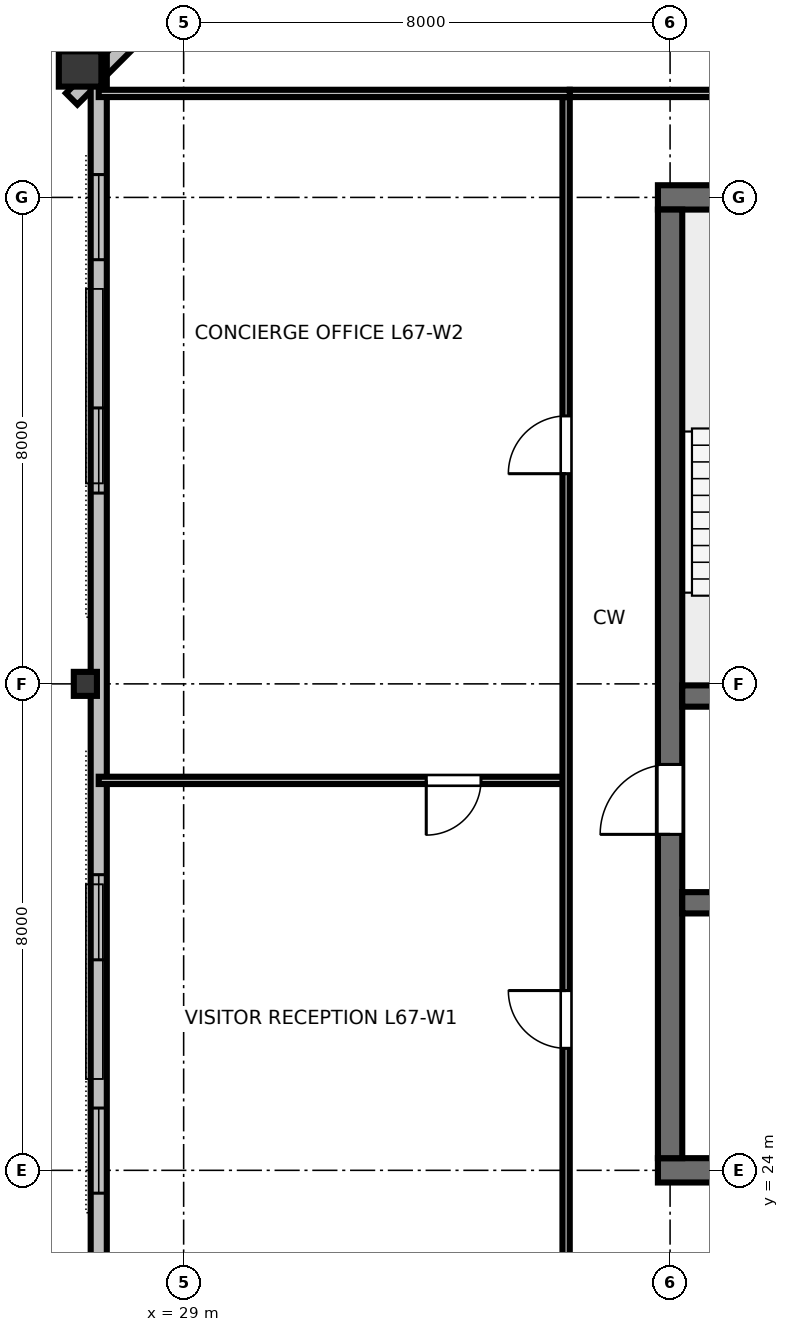
"""IFC4 building model, lengths in metres.
Left out: names, types, materials, properties, quantities, classifications, styles, units other than length and angle.
Written with IfcOpenShell. Run it as: python <this file> out.ifc"""

import sys

from ifc_helpers import new_model, si_unit, direction, frame, frame_2d, origin, origin_2d, place, context, subcontext, project, spatial, rectangle, hollow_rectangle, i_section, extrude, element, fill, save


model = new_model("IFC4")
c1 = context("Model", 3, precision=1e-05, world=origin(), true_north=direction((0.0, 1.0)))
c2 = subcontext(c1, "Body", "Model", "MODEL_VIEW")
j1 = project(units=[si_unit("LENGTHUNIT", "METRE"), si_unit("PLANEANGLEUNIT", "RADIAN")], contexts=[c1])
p1 = place(None, origin())
s1 = spatial("IfcSite", under=j1, at=p1, CompositionType="ELEMENT")
p2 = place(p1, origin())
s2 = spatial("IfcBuilding", under=s1, at=p2, CompositionType="ELEMENT")
p3 = place(p2, frame((0.0, 0.0, 253.8)))
s3 = spatial("IfcBuildingStorey", under=s2, at=p3, CompositionType="ELEMENT", Elevation=253.8)
p4 = place(p3, frame((36.8, 24.0, 0.0), z_axis=(0.0, 0.0, 1.0), x_axis=(1.0, 0.0, 0.0)))
e1 = element("IfcWall", 1, at=p4, inside=s3, PredefinedType="SHEAR", context=c2, shape_type="SweptSolid", body=[
    extrude(rectangle(XDim=18.4, YDim=0.4, at=frame_2d((9.2, 0.0))), origin(), (0.0, 0.0, 1.0), 3.36),
])
p5 = place(p4, frame((13.4, 0.0, 0.0)))
e2 = element("IfcOpeningElement", 2, at=p5, cuts=e1, PredefinedType="OPENING", context=c2, shape_type="SweptSolid", body=[
    extrude(rectangle(XDim=1.6, YDim=2.15, at=frame_2d((0.8, 1.075))), frame((0.0, 0.21, 0.0), z_axis=(0.0, -1.0, 0.0), x_axis=(1.0, 0.0, 0.0)), (0.0, 0.0, 1.0), 0.42),
])
p6 = place(p3, frame((36.8, 40.0, 0.0), z_axis=(0.0, 0.0, 1.0), x_axis=(1.0, 0.0, 0.0)))
e3 = element("IfcWall", 3, at=p6, inside=s3, PredefinedType="SHEAR", context=c2, shape_type="SweptSolid", body=[
    extrude(rectangle(XDim=18.4, YDim=0.4, at=frame_2d((9.2, 0.0))), origin(), (0.0, 0.0, 1.0), 3.36),
])
p7 = place(p6, frame((8.7, 0.0, 0.0)))
e4 = element("IfcOpeningElement", 4, at=p7, cuts=e3, PredefinedType="OPENING", context=c2, shape_type="SweptSolid", body=[
    extrude(rectangle(XDim=1.0, YDim=2.15, at=frame_2d((0.5, 1.075))), frame((0.0, 0.21, 0.0), z_axis=(0.0, -1.0, 0.0), x_axis=(1.0, 0.0, 0.0)), (0.0, 0.0, 1.0), 0.42),
])
p8 = place(p3, frame((37.0, 24.2, 0.0), z_axis=(0.0, 0.0, 1.0), x_axis=(0.0, 1.0, 0.0)))
e5 = element("IfcWall", 5, at=p8, inside=s3, PredefinedType="SHEAR", context=c2, shape_type="SweptSolid", body=[
    extrude(rectangle(XDim=15.6, YDim=0.4, at=frame_2d((7.8, 0.0))), origin(), (0.0, 0.0, 1.0), 3.36),
])
p9 = place(p8, frame((5.325, 0.0, 0.0)))
e6 = element("IfcOpeningElement", 6, at=p9, cuts=e5, PredefinedType="OPENING", context=c2, shape_type="SweptSolid", body=[
    extrude(rectangle(XDim=1.15, YDim=2.15, at=frame_2d((0.575, 1.075))), frame((0.0, 0.21, 0.0), z_axis=(0.0, -1.0, 0.0), x_axis=(1.0, 0.0, 0.0)), (0.0, 0.0, 1.0), 0.42),
])
p10 = place(p3, frame((37.2, 31.8, 0.0), z_axis=(0.0, 0.0, 1.0), x_axis=(1.0, 0.0, 0.0)))
e7 = element("IfcWall", 7, at=p10, inside=s3, PredefinedType="SHEAR", context=c2, shape_type="SweptSolid", body=[
    extrude(rectangle(XDim=17.6, YDim=0.35, at=frame_2d((8.8, 0.0))), origin(), (0.0, 0.0, 1.0), 3.36),
])
p11 = place(p10, frame((0.85, 0.0, 0.0)))
e8 = element("IfcOpeningElement", 8, at=p11, cuts=e7, PredefinedType="OPENING", context=c2, shape_type="SweptSolid", body=[
    extrude(rectangle(XDim=1.1, YDim=2.15, at=frame_2d((0.55, 1.075))), frame((0.0, 0.185, 0.0), z_axis=(0.0, -1.0, 0.0), x_axis=(1.0, 0.0, 0.0)), (0.0, 0.0, 1.0), 0.37),
])
p12 = place(p10, frame((14.75, 0.0, 0.0)))
e9 = element("IfcOpeningElement", 9, at=p12, cuts=e7, PredefinedType="OPENING", context=c2, shape_type="SweptSolid", body=[
    extrude(rectangle(XDim=1.1, YDim=2.15, at=frame_2d((0.55, 1.075))), frame((0.0, 0.185, 0.0), z_axis=(0.0, -1.0, 0.0), x_axis=(1.0, 0.0, 0.0)), (0.0, 0.0, 1.0), 0.37),
])
p13 = place(p3, frame((37.2, 28.4, 0.0), z_axis=(0.0, 0.0, 1.0), x_axis=(1.0, 0.0, 0.0)))
e10 = element("IfcWall", 10, at=p13, inside=s3, PredefinedType="SHEAR", context=c2, shape_type="SweptSolid", body=[
    extrude(rectangle(XDim=17.6, YDim=0.35, at=frame_2d((8.8, 0.0))), origin(), (0.0, 0.0, 1.0), 3.36),
])
p14 = place(p3, frame((27.297, 42.112, 0.0), z_axis=(0.0, 0.0, 1.0), x_axis=(0.0, 1.0, 0.0)))
e11 = element("IfcColumn", 11, at=p14, inside=s3, PredefinedType="COLUMN", context=c2, shape_type="SweptSolid", body=[
    extrude(hollow_rectangle(XDim=0.58, YDim=0.7, WallThickness=0.032, at=origin_2d()), origin(), (0.0, 0.0, 1.0), 3.373),
])
p15 = place(p3, frame((27.384, 32.0, 0.0), z_axis=(0.0, 0.0, 1.0), x_axis=(0.0, 1.0, 0.0)))
e12 = element("IfcColumn", 12, at=p15, inside=s3, PredefinedType="COLUMN", context=c2, shape_type="SweptSolid", body=[
    extrude(i_section(OverallWidth=0.395, OverallDepth=0.38, WebThickness=0.019, FlangeThickness=0.03, FilletRadius=0.025, at=origin_2d()), origin(), (0.0, 0.0, 1.0), 3.373),
])
p16 = place(p3, frame((34.807, 49.269, 0.0), z_axis=(0.0, 0.0, 1.0), x_axis=(-0.707106781187, -0.707106781187, 0.0)))
e13 = element("IfcWall", 13, at=p16, inside=s3, PredefinedType="STANDARD", context=c2, shape_type="SweptSolid", body=[
    extrude(rectangle(XDim=10.816, YDim=0.265, at=frame_2d((5.408, 0.0))), origin(), (0.0, 0.0, 1.0), 2.832),
])
p17 = place(p3, frame((27.604, 42.695, 0.0), z_axis=(0.0, 0.0, 1.0), x_axis=(0.0, -1.0, 0.0)))
e14 = element("IfcWall", 14, at=p17, inside=s3, PredefinedType="STANDARD", context=c2, shape_type="SweptSolid", body=[
    extrude(rectangle(XDim=21.389, YDim=0.265, at=frame_2d((10.695, 0.0))), origin(), (0.0, 0.0, 1.0), 2.832),
])
p18 = place(p17, frame((2.319, 0.0, 0.85)))
e15 = element("IfcOpeningElement", 15, at=p18, cuts=e14, PredefinedType="OPENING", context=c2, shape_type="SweptSolid", body=[
    extrude(rectangle(XDim=1.4, YDim=1.2, at=frame_2d((0.7, 0.6))), frame((0.0, 0.142, 0.0), z_axis=(0.0, -1.0, 0.0), x_axis=(1.0, 0.0, 0.0)), (0.0, 0.0, 1.0), 0.285),
])
p19 = place(p17, frame((6.157, 0.0, 0.85)))
e16 = element("IfcOpeningElement", 16, at=p19, cuts=e14, PredefinedType="OPENING", context=c2, shape_type="SweptSolid", body=[
    extrude(rectangle(XDim=1.4, YDim=1.2, at=frame_2d((0.7, 0.6))), frame((0.0, 0.142, 0.0), z_axis=(0.0, -1.0, 0.0), x_axis=(1.0, 0.0, 0.0)), (0.0, 0.0, 1.0), 0.285),
])
p20 = place(p17, frame((13.832, 0.0, 0.85)))
e17 = element("IfcOpeningElement", 17, at=p20, cuts=e14, PredefinedType="OPENING", context=c2, shape_type="SweptSolid", body=[
    extrude(rectangle(XDim=1.4, YDim=1.2, at=frame_2d((0.7, 0.6))), frame((0.0, 0.142, 0.0), z_axis=(0.0, -1.0, 0.0), x_axis=(1.0, 0.0, 0.0)), (0.0, 0.0, 1.0), 0.285),
])
p21 = place(p17, frame((17.67, 0.0, 0.85)))
e18 = element("IfcOpeningElement", 18, at=p21, cuts=e14, PredefinedType="OPENING", context=c2, shape_type="SweptSolid", body=[
    extrude(rectangle(XDim=1.4, YDim=1.2, at=frame_2d((0.7, 0.6))), frame((0.0, 0.142, 0.0), z_axis=(0.0, -1.0, 0.0), x_axis=(1.0, 0.0, 0.0)), (0.0, 0.0, 1.0), 0.285),
])
p22 = place(p3, frame((35.35, 41.71, 0.0), z_axis=(0.0, 0.0, 1.0), x_axis=(1.0, 0.0, 0.0)))
e19 = element("IfcWall", 19, at=p22, inside=s3, PredefinedType="PARTITIONING", context=c2, shape_type="SweptSolid", body=[
    extrude(rectangle(XDim=21.3, YDim=0.12, at=frame_2d((10.65, 0.0))), origin(), (0.0, 0.0, 1.0), 2.655),
])
p23 = place(p22, frame((3.472, 0.0, 0.0)))
e20 = element("IfcOpeningElement", 20, at=p23, cuts=e19, PredefinedType="OPENING", context=c2, shape_type="SweptSolid", body=[
    extrude(rectangle(XDim=0.95, YDim=2.15, at=frame_2d((0.475, 1.075))), frame((0.0, 0.07, 0.0), z_axis=(0.0, -1.0, 0.0), x_axis=(1.0, 0.0, 0.0)), (0.0, 0.0, 1.0), 0.14),
])
p24 = place(p22, frame((12.975, 0.0, 0.0)))
e21 = element("IfcOpeningElement", 21, at=p24, cuts=e19, PredefinedType="OPENING", context=c2, shape_type="SweptSolid", body=[
    extrude(rectangle(XDim=0.95, YDim=2.15, at=frame_2d((0.475, 1.075))), frame((0.0, 0.07, 0.0), z_axis=(0.0, -1.0, 0.0), x_axis=(1.0, 0.0, 0.0)), (0.0, 0.0, 1.0), 0.14),
])
p25 = place(p22, frame((17.735, 0.0, 0.0)))
e22 = element("IfcOpeningElement", 22, at=p25, cuts=e19, PredefinedType="OPENING", context=c2, shape_type="SweptSolid", body=[
    extrude(rectangle(XDim=0.95, YDim=2.15, at=frame_2d((0.475, 1.075))), frame((0.0, 0.07, 0.0), z_axis=(0.0, -1.0, 0.0), x_axis=(1.0, 0.0, 0.0)), (0.0, 0.0, 1.0), 0.14),
])
p26 = place(p3, frame((35.29, 30.413, 0.0), z_axis=(0.0, 0.0, 1.0), x_axis=(-1.0, 0.0, 0.0)))
e23 = element("IfcWall", 23, at=p26, inside=s3, PredefinedType="PARTITIONING", context=c2, shape_type="SweptSolid", body=[
    extrude(rectangle(XDim=7.687, YDim=0.12, at=frame_2d((3.843, 0.0))), origin(), (0.0, 0.0, 1.0), 2.655),
])
p27 = place(p26, frame((1.4, 0.0, 0.0)))
e24 = element("IfcOpeningElement", 24, at=p27, cuts=e23, PredefinedType="OPENING", context=c2, shape_type="SweptSolid", body=[
    extrude(rectangle(XDim=0.9, YDim=2.15, at=frame_2d((0.45, 1.075))), frame((0.0, 0.07, 0.0), z_axis=(0.0, -1.0, 0.0), x_axis=(1.0, 0.0, 0.0)), (0.0, 0.0, 1.0), 0.14),
])
p28 = place(p3, frame((35.29, 22.35, 0.0), z_axis=(0.0, 0.0, 1.0), x_axis=(0.0, 1.0, 0.0)))
e25 = element("IfcWall", 25, at=p28, inside=s3, PredefinedType="PARTITIONING", context=c2, shape_type="SweptSolid", body=[
    extrude(rectangle(XDim=19.3, YDim=0.12, at=frame_2d((9.65, 0.0))), origin(), (0.0, 0.0, 1.0), 2.655),
])
p29 = place(p28, frame((3.656, 0.0, 0.0)))
e26 = element("IfcOpeningElement", 26, at=p29, cuts=e25, PredefinedType="OPENING", context=c2, shape_type="SweptSolid", body=[
    extrude(rectangle(XDim=0.95, YDim=2.15, at=frame_2d((0.475, 1.075))), frame((0.0, 0.07, 0.0), z_axis=(0.0, -1.0, 0.0), x_axis=(1.0, 0.0, 0.0)), (0.0, 0.0, 1.0), 0.14),
])
p30 = place(p28, frame((13.106, 0.0, 0.0)))
e27 = element("IfcOpeningElement", 27, at=p30, cuts=e25, PredefinedType="OPENING", context=c2, shape_type="SweptSolid", body=[
    extrude(rectangle(XDim=0.95, YDim=2.15, at=frame_2d((0.475, 1.075))), frame((0.0, 0.07, 0.0), z_axis=(0.0, -1.0, 0.0), x_axis=(1.0, 0.0, 0.0)), (0.0, 0.0, 1.0), 0.14),
])
p31 = place(p3, frame((35.35, 41.71, 0.0), z_axis=(0.0, 0.0, 1.0), x_axis=(-1.0, 0.0, 0.0)))
e28 = element("IfcWall", 28, at=p31, inside=s3, PredefinedType="PARTITIONING", context=c2, shape_type="SweptSolid", body=[
    extrude(rectangle(XDim=7.747, YDim=0.12, at=frame_2d((3.873, 0.0))), origin(), (0.0, 0.0, 1.0), 2.655),
])
p32 = place(p18, origin())
e29 = element("IfcWindow", 29, at=p32, inside=s3, PartitioningType="SINGLE_PANEL", PredefinedType="WINDOW", context=c2, shape_type="SweptSolid", body=[
    extrude(rectangle(XDim=1.4, YDim=1.2, at=frame_2d((0.7, 0.6))), frame((0.0, 0.03, 0.0), z_axis=(0.0, -1.0, 0.0), x_axis=(1.0, 0.0, 0.0)), (0.0, 0.0, 1.0), 0.06),
])
fill(e15, e29)
p33 = place(p19, origin())
e30 = element("IfcWindow", 30, at=p33, inside=s3, PartitioningType="SINGLE_PANEL", PredefinedType="WINDOW", context=c2, shape_type="SweptSolid", body=[
    extrude(rectangle(XDim=1.4, YDim=1.2, at=frame_2d((0.7, 0.6))), frame((0.0, 0.03, 0.0), z_axis=(0.0, -1.0, 0.0), x_axis=(1.0, 0.0, 0.0)), (0.0, 0.0, 1.0), 0.06),
])
fill(e16, e30)
p34 = place(p20, origin())
e31 = element("IfcWindow", 31, at=p34, inside=s3, PartitioningType="SINGLE_PANEL", PredefinedType="WINDOW", context=c2, shape_type="SweptSolid", body=[
    extrude(rectangle(XDim=1.4, YDim=1.2, at=frame_2d((0.7, 0.6))), frame((0.0, 0.03, 0.0), z_axis=(0.0, -1.0, 0.0), x_axis=(1.0, 0.0, 0.0)), (0.0, 0.0, 1.0), 0.06),
])
fill(e17, e31)
p35 = place(p21, origin())
e32 = element("IfcWindow", 32, at=p35, inside=s3, PartitioningType="SINGLE_PANEL", PredefinedType="WINDOW", context=c2, shape_type="SweptSolid", body=[
    extrude(rectangle(XDim=1.4, YDim=1.2, at=frame_2d((0.7, 0.6))), frame((0.0, 0.03, 0.0), z_axis=(0.0, -1.0, 0.0), x_axis=(1.0, 0.0, 0.0)), (0.0, 0.0, 1.0), 0.06),
])
fill(e18, e32)
p36 = place(p9, origin())
e33 = element("IfcDoor", 33, at=p36, inside=s3, OperationType="SINGLE_SWING_LEFT", PredefinedType="DOOR", context=c2, shape_type="SweptSolid", body=[
    extrude(rectangle(XDim=1.15, YDim=2.15, at=frame_2d((0.575, 1.075))), frame((0.0, 0.025, 0.0), z_axis=(0.0, -1.0, 0.0), x_axis=(1.0, 0.0, 0.0)), (0.0, 0.0, 1.0), 0.05),
])
fill(e6, e33)
p37 = place(p27, origin())
e34 = element("IfcDoor", 34, at=p37, inside=s3, OperationType="SINGLE_SWING_RIGHT", PredefinedType="DOOR", context=c2, shape_type="SweptSolid", body=[
    extrude(rectangle(XDim=0.9, YDim=2.15, at=frame_2d((0.45, 1.075))), frame((0.0, 0.025, 0.0), z_axis=(0.0, -1.0, 0.0), x_axis=(1.0, 0.0, 0.0)), (0.0, 0.0, 1.0), 0.05),
])
fill(e24, e34)
p38 = place(p29, origin())
e35 = element("IfcDoor", 35, at=p38, inside=s3, OperationType="SINGLE_SWING_RIGHT", PredefinedType="DOOR", context=c2, shape_type="SweptSolid", body=[
    extrude(rectangle(XDim=0.95, YDim=2.15, at=frame_2d((0.475, 1.075))), frame((0.0, 0.025, 0.0), z_axis=(0.0, -1.0, 0.0), x_axis=(1.0, 0.0, 0.0)), (0.0, 0.0, 1.0), 0.05),
])
fill(e26, e35)
p39 = place(p30, origin())
e36 = element("IfcDoor", 36, at=p39, inside=s3, OperationType="SINGLE_SWING_LEFT", PredefinedType="DOOR", context=c2, shape_type="SweptSolid", body=[
    extrude(rectangle(XDim=0.95, YDim=2.15, at=frame_2d((0.475, 1.075))), frame((0.0, 0.025, 0.0), z_axis=(0.0, -1.0, 0.0), x_axis=(1.0, 0.0, 0.0)), (0.0, 0.0, 1.0), 0.05),
])
fill(e27, e36)
save(model, sys.argv[1])
